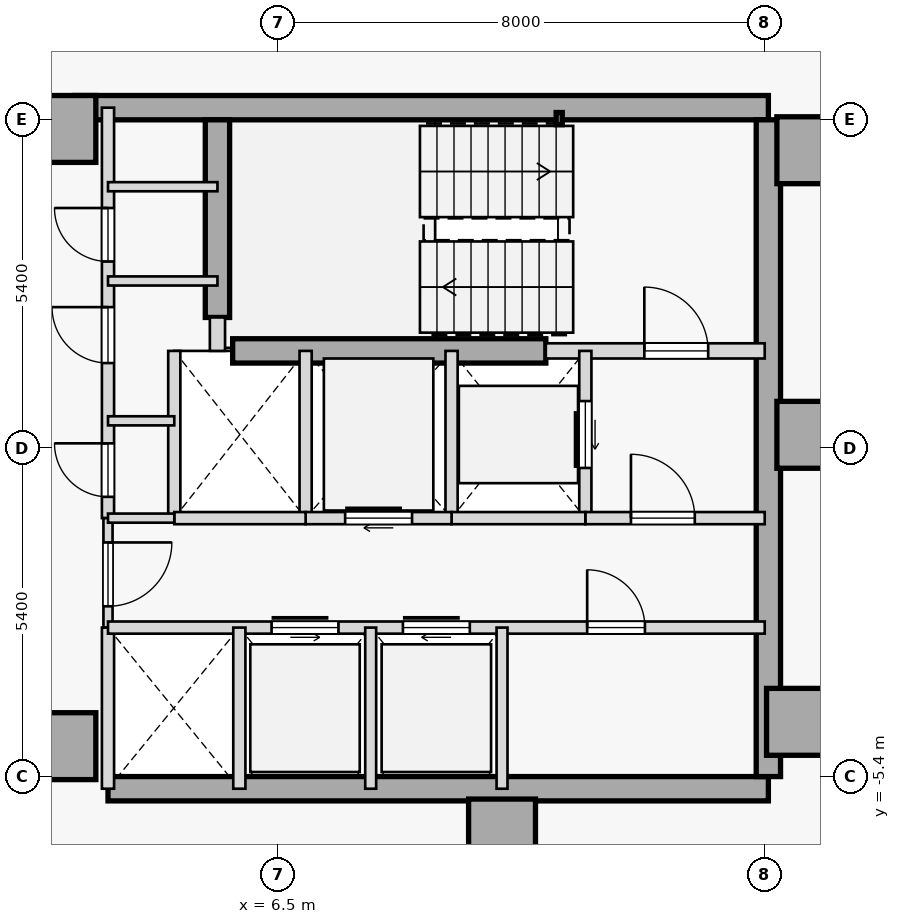
"""IFC4 building model, lengths in metres.
Left out: names, types, materials, properties, quantities, classifications, styles, units other than length and angle.
Written with IfcOpenShell. Run it as: python <this file> out.ifc"""

import sys

from ifc_helpers import new_model, si_unit, direction, frame, frame_2d, origin, origin_2d, place, context, subcontext, project, spatial, rectangle, hollow_rectangle, extrude, element, fill, save


model = new_model("IFC4")
c1 = context("Model", 3, precision=1e-05, world=origin(), true_north=direction((0.0, 1.0)))
c2 = subcontext(c1, "Body", "Model", "MODEL_VIEW")
j1 = project(units=[si_unit("LENGTHUNIT", "METRE"), si_unit("PLANEANGLEUNIT", "RADIAN")], contexts=[c1])
p1 = place(None, origin())
s1 = spatial("IfcSite", under=j1, at=p1, CompositionType="ELEMENT")
p2 = place(p1, origin())
s2 = spatial("IfcBuilding", under=s1, at=p2, CompositionType="ELEMENT")
p3 = place(p2, frame((0.0, 0.0, 188.8)))
s3 = spatial("IfcBuildingStorey", under=s2, at=p3, CompositionType="ELEMENT", Elevation=188.8)
for number, where, z_axis, x_axis in (
    (1, (15.25, 4.9, 0.0), (0.0, 0.0, 1.0), (1.0, 0.0, 0.0)),
    (2, (15.25, 0.22, 0.0), (0.0, 0.0, 1.0), (1.0, 0.0, 0.0)),
    (3, (15.08, -4.5, 0.0), (0.0, 0.0, 1.0), (1.0, 0.0, 0.0)),
    (4, (10.18, -6.32, 0.0), (0.0, 0.0, 1.0), (1.0, 0.0, 0.0)),
    (5, (2.95, -4.9, 0.0), (0.0, 0.0, 1.0), (1.0, 0.0, 0.0)),
    (6, (2.95, 5.25, 0.0), (0.0, 0.0, 1.0), (1.0, 0.0, 0.0)),
):
    element("IfcColumn", number, at=place(p3, frame(where, z_axis=z_axis, x_axis=x_axis)), inside=s3, PredefinedType="COLUMN", context=c2, shape_type="SweptSolid", body=[
        extrude(rectangle(XDim=1.1, YDim=1.1, at=origin_2d()), origin(), (0.0, 0.0, 1.0), 3.4),
    ])
p4 = place(p3, frame((3.15, 5.6, 0.0), z_axis=(0.0, 0.0, 1.0), x_axis=(1.0, 0.0, 0.0)))
e7 = element("IfcWall", 7, at=p4, inside=s3, PredefinedType="SHEAR", context=c2, shape_type="SweptSolid", body=[
    extrude(rectangle(XDim=11.41, YDim=0.4, at=frame_2d((5.705, 0.0))), origin(), (0.0, 0.0, 1.0), 3.175),
])
p5 = place(p3, frame((3.7, -5.6, 0.0), z_axis=(0.0, 0.0, 1.0), x_axis=(1.0, 0.0, 0.0)))
e8 = element("IfcWall", 8, at=p5, inside=s3, PredefinedType="SHEAR", context=c2, shape_type="SweptSolid", body=[
    extrude(rectangle(XDim=10.86, YDim=0.4, at=frame_2d((5.43, 0.0))), origin(), (0.0, 0.0, 1.0), 3.175),
])
p6 = place(p3, frame((14.56, -5.4, 0.0), z_axis=(0.0, 0.0, 1.0), x_axis=(0.0, 1.0, 0.0)))
e9 = element("IfcWall", 9, at=p6, inside=s3, PredefinedType="SHEAR", context=c2, shape_type="SweptSolid", body=[
    extrude(rectangle(XDim=10.8, YDim=0.4, at=frame_2d((5.4, 0.0))), origin(), (0.0, 0.0, 1.0), 3.175),
])
p7 = place(p3, frame((5.5, 2.15, 0.0), z_axis=(0.0, 0.0, 1.0), x_axis=(0.0, 1.0, 0.0)))
e10 = element("IfcWall", 10, at=p7, inside=s3, PredefinedType="SHEAR", context=c2, shape_type="SweptSolid", body=[
    extrude(rectangle(XDim=3.25, YDim=0.4, at=frame_2d((1.625, 0.0))), origin(), (0.0, 0.0, 1.0), 3.175),
])
p8 = place(p3, frame((5.75, 1.6, 0.0), z_axis=(0.0, 0.0, 1.0), x_axis=(1.0, 0.0, 0.0)))
e11 = element("IfcWall", 11, at=p8, inside=s3, PredefinedType="SHEAR", context=c2, shape_type="SweptSolid", body=[
    extrude(rectangle(XDim=5.15, YDim=0.4, at=frame_2d((2.575, 0.0))), origin(), (0.0, 0.0, 1.0), 3.175),
])
p9 = place(p3, frame((11.12, 5.42, 0.0), z_axis=(0.0, 0.0, 1.0), x_axis=(1.0, 0.0, 0.0)))
e12 = element("IfcColumn", 12, at=p9, inside=s3, PredefinedType="COLUMN", context=c2, shape_type="SweptSolid", body=[
    extrude(hollow_rectangle(XDim=0.1, YDim=0.2, WallThickness=0.008, at=origin_2d()), origin(), (0.0, 0.0, 1.0), 3.4),
])
p10 = place(p3, frame((10.9, 1.6, 0.0), z_axis=(0.0, 0.0, 1.0), x_axis=(1.0, 0.0, 0.0)))
e13 = element("IfcWall", 13, at=p10, inside=s3, PredefinedType="STANDARD", context=c2, shape_type="SweptSolid", body=[
    extrude(rectangle(XDim=3.6, YDim=0.25, at=frame_2d((1.8, 0.0))), origin(), (0.0, 0.0, 1.0), 3.175),
])
p11 = place(p10, frame((1.62, 0.0, 0.0)))
e14 = element("IfcOpeningElement", 14, at=p11, cuts=e13, PredefinedType="OPENING", context=c2, shape_type="SweptSolid", body=[
    extrude(rectangle(XDim=1.05, YDim=2.15, at=frame_2d((0.525, 1.075))), frame((0.0, 0.135, 0.0), z_axis=(0.0, -1.0, 0.0), x_axis=(1.0, 0.0, 0.0)), (0.0, 0.0, 1.0), 0.27),
])
p12 = place(p3, frame((5.5, 1.6, 0.0), z_axis=(0.0, 0.0, 1.0), x_axis=(0.0, 1.0, 0.0)))
e15 = element("IfcWall", 15, at=p12, inside=s3, PredefinedType="STANDARD", context=c2, shape_type="SweptSolid", body=[
    extrude(rectangle(XDim=0.55, YDim=0.25, at=frame_2d((0.275, 0.0))), origin(), (0.0, 0.0, 1.0), 3.175),
])
p13 = place(p3, frame((3.7, -1.15, 0.0), z_axis=(0.0, 0.0, 1.0), x_axis=(0.0, 1.0, 0.0)))
e16 = element("IfcWall", 16, at=p13, inside=s3, PredefinedType="STANDARD", context=c2, shape_type="SweptSolid", body=[
    extrude(rectangle(XDim=6.75, YDim=0.2, at=frame_2d((3.375, 0.0))), origin(), (0.0, 0.0, 1.0), 3.175),
])
p14 = place(p13, frame((0.35, 0.0, 0.0)))
e17 = element("IfcOpeningElement", 17, at=p14, cuts=e16, PredefinedType="OPENING", context=c2, shape_type="SweptSolid", body=[
    extrude(rectangle(XDim=0.88, YDim=2.15, at=frame_2d((0.44, 1.075))), frame((0.0, 0.11, 0.0), z_axis=(0.0, -1.0, 0.0), x_axis=(1.0, 0.0, 0.0)), (0.0, 0.0, 1.0), 0.22),
])
p15 = place(p13, frame((2.55, 0.0, 0.0)))
e18 = element("IfcOpeningElement", 18, at=p15, cuts=e16, PredefinedType="OPENING", context=c2, shape_type="SweptSolid", body=[
    extrude(rectangle(XDim=0.92, YDim=2.15, at=frame_2d((0.46, 1.075))), frame((0.0, 0.11, 0.0), z_axis=(0.0, -1.0, 0.0), x_axis=(1.0, 0.0, 0.0)), (0.0, 0.0, 1.0), 0.22),
])
p16 = place(p13, frame((4.22, 0.0, 0.0)))
e19 = element("IfcOpeningElement", 19, at=p16, cuts=e16, PredefinedType="OPENING", context=c2, shape_type="SweptSolid", body=[
    extrude(rectangle(XDim=0.88, YDim=2.15, at=frame_2d((0.44, 1.075))), frame((0.0, 0.11, 0.0), z_axis=(0.0, -1.0, 0.0), x_axis=(1.0, 0.0, 0.0)), (0.0, 0.0, 1.0), 0.22),
])
p17 = place(p3, frame((3.7, -2.95, 0.0), z_axis=(0.0, 0.0, 1.0), x_axis=(0.0, 1.0, 0.0)))
e20 = element("IfcWall", 20, at=p17, inside=s3, PredefinedType="PARTITIONING", context=c2, shape_type="SweptSolid", body=[
    extrude(rectangle(XDim=1.8, YDim=0.15, at=frame_2d((0.9, 0.0))), origin(), (0.0, 0.0, 1.0), 3.175),
])
p18 = place(p17, frame((0.35, 0.0, 0.0)))
e21 = element("IfcOpeningElement", 21, at=p18, cuts=e20, PredefinedType="OPENING", context=c2, shape_type="SweptSolid", body=[
    extrude(rectangle(XDim=1.05, YDim=2.18, at=frame_2d((0.525, 1.09))), frame((0.0, 0.085, 0.0), z_axis=(0.0, -1.0, 0.0), x_axis=(1.0, 0.0, 0.0)), (0.0, 0.0, 1.0), 0.17),
])
p19 = place(p3, frame((3.7, -5.6, 0.0), z_axis=(0.0, 0.0, 1.0), x_axis=(0.0, 1.0, 0.0)))
e22 = element("IfcWall", 22, at=p19, inside=s3, PredefinedType="STANDARD", context=c2, shape_type="SweptSolid", body=[
    extrude(rectangle(XDim=2.65, YDim=0.2, at=frame_2d((1.325, 0.0))), origin(), (0.0, 0.0, 1.0), 3.175),
])
p20 = place(p3, frame((11.55, -1.15, 0.0), z_axis=(0.0, 0.0, 1.0), x_axis=(0.0, 1.0, 0.0)))
e23 = element("IfcWall", 23, at=p20, inside=s3, PredefinedType="STANDARD", context=c2, shape_type="SweptSolid", body=[
    extrude(rectangle(XDim=2.75, YDim=0.2, at=frame_2d((1.375, 0.0))), origin(), (0.0, 0.0, 1.0), 3.175),
])
p21 = place(p20, frame((0.825, 0.0, 0.0)))
e24 = element("IfcOpeningElement", 24, at=p21, cuts=e23, PredefinedType="OPENING", context=c2, shape_type="SweptSolid", body=[
    extrude(rectangle(XDim=1.1, YDim=2.15, at=frame_2d((0.55, 1.075))), frame((0.0, 0.11, 0.0), z_axis=(0.0, -1.0, 0.0), x_axis=(1.0, 0.0, 0.0)), (0.0, 0.0, 1.0), 0.22),
])
p22 = place(p3, frame((9.35, -1.15, 0.0), z_axis=(0.0, 0.0, 1.0), x_axis=(0.0, 1.0, 0.0)))
e25 = element("IfcWall", 25, at=p22, inside=s3, PredefinedType="STANDARD", context=c2, shape_type="SweptSolid", body=[
    extrude(rectangle(XDim=2.75, YDim=0.2, at=frame_2d((1.375, 0.0))), origin(), (0.0, 0.0, 1.0), 3.175),
])
p23 = place(p3, frame((11.55, -1.15, 0.0), z_axis=(0.0, 0.0, 1.0), x_axis=(1.0, 0.0, 0.0)))
e26 = element("IfcWall", 26, at=p23, inside=s3, PredefinedType="STANDARD", context=c2, shape_type="SweptSolid", body=[
    extrude(rectangle(XDim=2.95, YDim=0.2, at=frame_2d((1.475, 0.0))), origin(), (0.0, 0.0, 1.0), 3.175),
])
p24 = place(p23, frame((0.75, 0.0, 0.0)))
e27 = element("IfcOpeningElement", 27, at=p24, cuts=e26, PredefinedType="OPENING", context=c2, shape_type="SweptSolid", body=[
    extrude(rectangle(XDim=1.05, YDim=2.18, at=frame_2d((0.525, 1.09))), frame((0.0, 0.11, 0.0), z_axis=(0.0, -1.0, 0.0), x_axis=(1.0, 0.0, 0.0)), (0.0, 0.0, 1.0), 0.22),
])
p25 = place(p3, frame((9.35, -1.15, 0.0), z_axis=(0.0, 0.0, 1.0), x_axis=(1.0, 0.0, 0.0)))
e28 = element("IfcWall", 28, at=p25, inside=s3, PredefinedType="STANDARD", context=c2, shape_type="SweptSolid", body=[
    extrude(rectangle(XDim=2.2, YDim=0.2, at=frame_2d((1.1, 0.0))), origin(), (0.0, 0.0, 1.0), 3.175),
])
p26 = place(p3, frame((6.95, -1.15, 0.0), z_axis=(0.0, 0.0, 1.0), x_axis=(0.0, 1.0, 0.0)))
e29 = element("IfcWall", 29, at=p26, inside=s3, PredefinedType="STANDARD", context=c2, shape_type="SweptSolid", body=[
    extrude(rectangle(XDim=2.75, YDim=0.2, at=frame_2d((1.375, 0.0))), origin(), (0.0, 0.0, 1.0), 3.175),
])
p27 = place(p3, frame((6.95, -1.15, 0.0), z_axis=(0.0, 0.0, 1.0), x_axis=(1.0, 0.0, 0.0)))
e30 = element("IfcWall", 30, at=p27, inside=s3, PredefinedType="STANDARD", context=c2, shape_type="SweptSolid", body=[
    extrude(rectangle(XDim=2.4, YDim=0.2, at=frame_2d((1.2, 0.0))), origin(), (0.0, 0.0, 1.0), 3.175),
])
p28 = place(p27, frame((0.65, 0.0, 0.0)))
e31 = element("IfcOpeningElement", 31, at=p28, cuts=e30, PredefinedType="OPENING", context=c2, shape_type="SweptSolid", body=[
    extrude(rectangle(XDim=1.1, YDim=2.15, at=frame_2d((0.55, 1.075))), frame((0.0, 0.11, 0.0), z_axis=(0.0, -1.0, 0.0), x_axis=(1.0, 0.0, 0.0)), (0.0, 0.0, 1.0), 0.22),
])
p29 = place(p3, frame((4.79, -1.15, 0.0), z_axis=(0.0, 0.0, 1.0), x_axis=(0.0, 1.0, 0.0)))
e32 = element("IfcWall", 32, at=p29, inside=s3, PredefinedType="STANDARD", context=c2, shape_type="SweptSolid", body=[
    extrude(rectangle(XDim=2.75, YDim=0.2, at=frame_2d((1.375, 0.0))), origin(), (0.0, 0.0, 1.0), 3.175),
])
p30 = place(p3, frame((4.79, -1.15, 0.0), z_axis=(0.0, 0.0, 1.0), x_axis=(1.0, 0.0, 0.0)))
e33 = element("IfcWall", 33, at=p30, inside=s3, PredefinedType="STANDARD", context=c2, shape_type="SweptSolid", body=[
    extrude(rectangle(XDim=2.16, YDim=0.2, at=frame_2d((1.08, 0.0))), origin(), (0.0, 0.0, 1.0), 3.175),
])
p31 = place(p3, frame((3.7, -1.15, 0.0), z_axis=(0.0, 0.0, 1.0), x_axis=(1.0, 0.0, 0.0)))
e34 = element("IfcWall", 34, at=p31, inside=s3, PredefinedType="PARTITIONING", context=c2, shape_type="SweptSolid", body=[
    extrude(rectangle(XDim=1.09, YDim=0.15, at=frame_2d((0.545, 0.0))), origin(), (0.0, 0.0, 1.0), 3.175),
])
p32 = place(p3, frame((3.7, -2.95, 0.0), z_axis=(0.0, 0.0, 1.0), x_axis=(1.0, 0.0, 0.0)))
e35 = element("IfcWall", 35, at=p32, inside=s3, PredefinedType="STANDARD", context=c2, shape_type="SweptSolid", body=[
    extrude(rectangle(XDim=10.8, YDim=0.2, at=frame_2d((5.4, 0.0))), origin(), (0.0, 0.0, 1.0), 3.175),
])
p33 = place(p32, frame((2.69, 0.0, 0.0)))
e36 = element("IfcOpeningElement", 36, at=p33, cuts=e35, PredefinedType="OPENING", context=c2, shape_type="SweptSolid", body=[
    extrude(rectangle(XDim=1.1, YDim=2.15, at=frame_2d((0.55, 1.075))), frame((0.0, 0.11, 0.0), z_axis=(0.0, -1.0, 0.0), x_axis=(1.0, 0.0, 0.0)), (0.0, 0.0, 1.0), 0.22),
])
p34 = place(p32, frame((4.85, 0.0, 0.0)))
e37 = element("IfcOpeningElement", 37, at=p34, cuts=e35, PredefinedType="OPENING", context=c2, shape_type="SweptSolid", body=[
    extrude(rectangle(XDim=1.1, YDim=2.15, at=frame_2d((0.55, 1.075))), frame((0.0, 0.11, 0.0), z_axis=(0.0, -1.0, 0.0), x_axis=(1.0, 0.0, 0.0)), (0.0, 0.0, 1.0), 0.22),
])
p35 = place(p32, frame((7.88, 0.0, 0.0)))
e38 = element("IfcOpeningElement", 38, at=p35, cuts=e35, PredefinedType="OPENING", context=c2, shape_type="SweptSolid", body=[
    extrude(rectangle(XDim=0.95, YDim=2.15, at=frame_2d((0.475, 1.075))), frame((0.0, 0.11, 0.0), z_axis=(0.0, -1.0, 0.0), x_axis=(1.0, 0.0, 0.0)), (0.0, 0.0, 1.0), 0.22),
])
p36 = place(p3, frame((5.86, -5.6, 0.0), z_axis=(0.0, 0.0, 1.0), x_axis=(0.0, 1.0, 0.0)))
e39 = element("IfcWall", 39, at=p36, inside=s3, PredefinedType="STANDARD", context=c2, shape_type="SweptSolid", body=[
    extrude(rectangle(XDim=2.65, YDim=0.2, at=frame_2d((1.325, 0.0))), origin(), (0.0, 0.0, 1.0), 3.175),
])
for number, where, z_axis, x_axis in (
    (40, (10.18, -5.6, 0.0), (0.0, 0.0, 1.0), (0.0, 1.0, 0.0)),
    (41, (8.02, -5.6, 0.0), (0.0, 0.0, 1.0), (0.0, 1.0, 0.0)),
):
    element("IfcWall", number, at=place(p3, frame(where, z_axis=z_axis, x_axis=x_axis)), inside=s3, PredefinedType="STANDARD", context=c2, shape_type="SweptSolid", body=[
        extrude(rectangle(XDim=2.65, YDim=0.18, at=frame_2d((1.325, 0.0))), origin(), (0.0, 0.0, 1.0), 3.175),
    ])
p37 = place(p3, frame((3.7, 4.3, 0.0), z_axis=(0.0, 0.0, 1.0), x_axis=(1.0, 0.0, 0.0)))
e42 = element("IfcWall", 42, at=p37, inside=s3, PredefinedType="PARTITIONING", context=c2, shape_type="SweptSolid", body=[
    extrude(rectangle(XDim=1.8, YDim=0.15, at=frame_2d((0.9, 0.0))), origin(), (0.0, 0.0, 1.0), 3.175),
])
p38 = place(p3, frame((3.7, 0.45, 0.0), z_axis=(0.0, 0.0, 1.0), x_axis=(1.0, 0.0, 0.0)))
e43 = element("IfcWall", 43, at=p38, inside=s3, PredefinedType="PARTITIONING", context=c2, shape_type="SweptSolid", body=[
    extrude(rectangle(XDim=1.09, YDim=0.15, at=frame_2d((0.545, 0.0))), origin(), (0.0, 0.0, 1.0), 3.175),
])
p39 = place(p3, frame((3.7, 2.75, 0.0), z_axis=(0.0, 0.0, 1.0), x_axis=(1.0, 0.0, 0.0)))
e44 = element("IfcWall", 44, at=p39, inside=s3, PredefinedType="PARTITIONING", context=c2, shape_type="SweptSolid", body=[
    extrude(rectangle(XDim=1.8, YDim=0.15, at=frame_2d((0.9, 0.0))), origin(), (0.0, 0.0, 1.0), 3.175),
])
p40 = place(p11, origin())
e45 = element("IfcDoor", 45, at=p40, inside=s3, OperationType="SINGLE_SWING_LEFT", PredefinedType="DOOR", context=c2, shape_type="SweptSolid", body=[
    extrude(rectangle(XDim=1.05, YDim=2.15, at=frame_2d((0.525, 1.075))), frame((0.0, 0.025, 0.0), z_axis=(0.0, -1.0, 0.0), x_axis=(1.0, 0.0, 0.0)), (0.0, 0.0, 1.0), 0.05),
])
fill(e14, e45)
p41 = place(p24, origin())
e46 = element("IfcDoor", 46, at=p41, inside=s3, OperationType="SINGLE_SWING_LEFT", PredefinedType="DOOR", context=c2, shape_type="SweptSolid", body=[
    extrude(rectangle(XDim=1.05, YDim=2.18, at=frame_2d((0.525, 1.09))), frame((0.0, 0.025, 0.0), z_axis=(0.0, -1.0, 0.0), x_axis=(1.0, 0.0, 0.0)), (0.0, 0.0, 1.0), 0.05),
])
fill(e27, e46)
p42 = place(p18, frame((1.05, 0.0, 0.0), z_axis=(0.0, 0.0, 1.0), x_axis=(-1.0, 0.0, 0.0)))
e47 = element("IfcDoor", 47, at=p42, inside=s3, OperationType="SINGLE_SWING_RIGHT", PredefinedType="DOOR", context=c2, shape_type="SweptSolid", body=[
    extrude(rectangle(XDim=1.05, YDim=2.18, at=frame_2d((0.525, 1.09))), frame((0.0, 0.025, 0.0), z_axis=(0.0, -1.0, 0.0), x_axis=(1.0, 0.0, 0.0)), (0.0, 0.0, 1.0), 0.05),
])
fill(e21, e47)
p43 = place(p21, origin())
e48 = element("IfcDoor", 48, at=p43, inside=s3, OperationType="SLIDING_TO_RIGHT", PredefinedType="DOOR", context=c2, shape_type="SweptSolid", body=[
    extrude(rectangle(XDim=1.1, YDim=2.15, at=frame_2d((0.55, 1.075))), frame((0.0, 0.025, 0.0), z_axis=(0.0, -1.0, 0.0), x_axis=(1.0, 0.0, 0.0)), (0.0, 0.0, 1.0), 0.05),
])
fill(e24, e48)
p44 = place(p28, origin())
e49 = element("IfcDoor", 49, at=p44, inside=s3, OperationType="SLIDING_TO_RIGHT", PredefinedType="DOOR", context=c2, shape_type="SweptSolid", body=[
    extrude(rectangle(XDim=1.1, YDim=2.15, at=frame_2d((0.55, 1.075))), frame((0.0, 0.025, 0.0), z_axis=(0.0, -1.0, 0.0), x_axis=(1.0, 0.0, 0.0)), (0.0, 0.0, 1.0), 0.05),
])
fill(e31, e49)
p45 = place(p33, origin())
e50 = element("IfcDoor", 50, at=p45, inside=s3, OperationType="SLIDING_TO_LEFT", PredefinedType="DOOR", context=c2, shape_type="SweptSolid", body=[
    extrude(rectangle(XDim=1.1, YDim=2.15, at=frame_2d((0.55, 1.075))), frame((0.0, 0.025, 0.0), z_axis=(0.0, -1.0, 0.0), x_axis=(1.0, 0.0, 0.0)), (0.0, 0.0, 1.0), 0.05),
])
fill(e36, e50)
p46 = place(p34, origin())
e51 = element("IfcDoor", 51, at=p46, inside=s3, OperationType="SLIDING_TO_RIGHT", PredefinedType="DOOR", context=c2, shape_type="SweptSolid", body=[
    extrude(rectangle(XDim=1.1, YDim=2.15, at=frame_2d((0.55, 1.075))), frame((0.0, 0.025, 0.0), z_axis=(0.0, -1.0, 0.0), x_axis=(1.0, 0.0, 0.0)), (0.0, 0.0, 1.0), 0.05),
])
fill(e37, e51)
p47 = place(p35, origin())
e52 = element("IfcDoor", 52, at=p47, inside=s3, OperationType="SINGLE_SWING_LEFT", PredefinedType="DOOR", context=c2, shape_type="SweptSolid", body=[
    extrude(rectangle(XDim=0.95, YDim=2.15, at=frame_2d((0.475, 1.075))), frame((0.0, 0.025, 0.0), z_axis=(0.0, -1.0, 0.0), x_axis=(1.0, 0.0, 0.0)), (0.0, 0.0, 1.0), 0.05),
])
fill(e38, e52)
p48 = place(p14, origin())
e53 = element("IfcDoor", 53, at=p48, inside=s3, OperationType="SINGLE_SWING_RIGHT", PredefinedType="DOOR", context=c2, shape_type="SweptSolid", body=[
    extrude(rectangle(XDim=0.88, YDim=2.15, at=frame_2d((0.44, 1.075))), frame((0.0, 0.025, 0.0), z_axis=(0.0, -1.0, 0.0), x_axis=(1.0, 0.0, 0.0)), (0.0, 0.0, 1.0), 0.05),
])
fill(e17, e53)
p49 = place(p15, origin())
e54 = element("IfcDoor", 54, at=p49, inside=s3, OperationType="SINGLE_SWING_RIGHT", PredefinedType="DOOR", context=c2, shape_type="SweptSolid", body=[
    extrude(rectangle(XDim=0.92, YDim=2.15, at=frame_2d((0.46, 1.075))), frame((0.0, 0.025, 0.0), z_axis=(0.0, -1.0, 0.0), x_axis=(1.0, 0.0, 0.0)), (0.0, 0.0, 1.0), 0.05),
])
fill(e18, e54)
p50 = place(p16, origin())
e55 = element("IfcDoor", 55, at=p50, inside=s3, OperationType="SINGLE_SWING_RIGHT", PredefinedType="DOOR", context=c2, shape_type="SweptSolid", body=[
    extrude(rectangle(XDim=0.88, YDim=2.15, at=frame_2d((0.44, 1.075))), frame((0.0, 0.025, 0.0), z_axis=(0.0, -1.0, 0.0), x_axis=(1.0, 0.0, 0.0)), (0.0, 0.0, 1.0), 0.05),
])
fill(e19, e55)
save(model, sys.argv[1])
